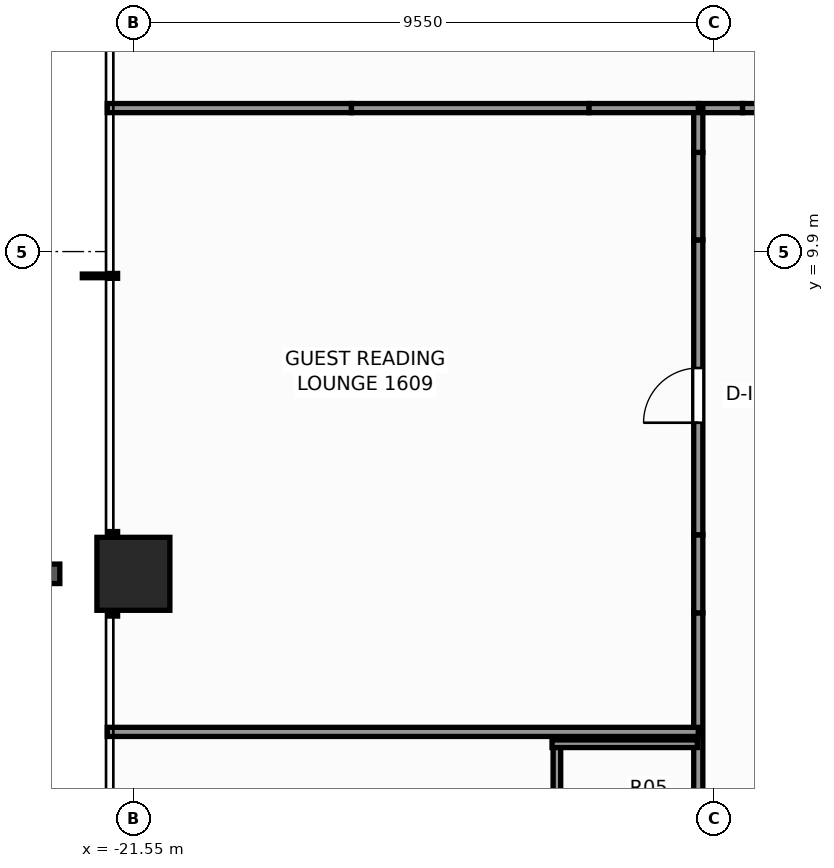
"""IFC4 building model, lengths in metres.
Left out: names, types, materials, properties, quantities, classifications, styles, units other than length and angle.
Written with IfcOpenShell. Run it as: python <this file> out.ifc"""

import sys

from ifc_helpers import new_model, si_unit, direction, frame, frame_2d, origin, origin_2d, place, context, subcontext, project, spatial, rectangle, extrude, element, fill, save


model = new_model("IFC4")
c1 = context("Model", 3, precision=1e-05, world=origin(), true_north=direction((0.0, 1.0)))
c2 = subcontext(c1, "Body", "Model", "MODEL_VIEW")
j1 = project(units=[si_unit("LENGTHUNIT", "METRE"), si_unit("PLANEANGLEUNIT", "RADIAN")], contexts=[c1])
p1 = place(None, origin())
s1 = spatial("IfcSite", under=j1, at=p1, CompositionType="ELEMENT")
p2 = place(p1, origin())
s2 = spatial("IfcBuilding", under=s1, at=p2, CompositionType="ELEMENT")
p3 = place(p2, frame((0.0, 0.0, 56.8)))
s3 = spatial("IfcBuildingStorey", under=s2, at=p3, CompositionType="ELEMENT", Elevation=56.8)
p4 = place(p3, frame((-21.55, 4.6, 0.0), z_axis=(0.0, 0.0, 1.0), x_axis=(1.0, 0.0, 0.0)))
e1 = element("IfcColumn", 1, at=p4, inside=s3, PredefinedType="COLUMN", context=c2, shape_type="SweptSolid", body=[
    extrude(rectangle(XDim=1.2, YDim=1.2, at=origin_2d()), origin(), (0.0, 0.0, 1.0), 3.3),
])
p5 = place(p3, frame((-12.26, 12.26, 0.0), z_axis=(0.0, 0.0, 1.0), x_axis=(1.0, 0.0, 0.0)))
e2 = element("IfcWall", 2, at=p5, inside=s3, PredefinedType="PARTITIONING", context=c2, shape_type="SweptSolid", body=[
    extrude(rectangle(XDim=0.729, YDim=0.15, at=frame_2d((0.364, 0.0))), origin(), (0.0, 0.0, 1.0), 3.06),
])
p6 = place(p3, frame((-11.531, 12.26, 0.0), z_axis=(0.0, 0.0, 1.0), x_axis=(1.0, 0.0, 0.0)))
e3 = element("IfcWall", 3, at=p6, inside=s3, PredefinedType="PARTITIONING", context=c2, shape_type="SweptSolid", body=[
    extrude(rectangle(XDim=1.439, YDim=0.15, at=frame_2d((0.72, 0.0))), origin(), (0.0, 0.0, 1.0), 1.245),
])
p7 = place(p3, frame((-12.26, -3.958, 0.0), z_axis=(0.0, 0.0, 1.0), x_axis=(0.0, 1.0, 0.0)))
e4 = element("IfcWall", 4, at=p7, inside=s3, PredefinedType="PARTITIONING", context=c2, shape_type="SweptSolid", body=[
    extrude(rectangle(XDim=7.916, YDim=0.15, at=frame_2d((3.958, 0.0))), origin(), (0.0, 0.0, 1.0), 2.349),
])
p8 = place(p7, frame((0.986, 0.0, 0.0)))
e5 = element("IfcOpeningElement", 5, at=p8, cuts=e4, PredefinedType="OPENING", context=c2, shape_type="SweptSolid", body=[
    extrude(rectangle(XDim=0.95, YDim=2.06, at=frame_2d((0.475, 1.03))), frame((0.0, 0.085, 0.0), z_axis=(0.0, -1.0, 0.0), x_axis=(1.0, 0.0, 0.0)), (0.0, 0.0, 1.0), 0.17),
])
p9 = place(p3, frame((-12.26, 3.958, 0.0), z_axis=(0.0, 0.0, 1.0), x_axis=(0.0, 1.0, 0.0)))
e6 = element("IfcWall", 6, at=p9, inside=s3, PredefinedType="PARTITIONING", context=c2, shape_type="SweptSolid", body=[
    extrude(rectangle(XDim=1.284, YDim=0.15, at=frame_2d((0.642, 0.0))), origin(), (0.0, 0.0, 1.0), 1.245),
])
p10 = place(p3, frame((-12.26, 5.242, 0.0), z_axis=(0.0, 0.0, 1.0), x_axis=(0.0, 1.0, 0.0)))
e7 = element("IfcWall", 7, at=p10, inside=s3, PredefinedType="PARTITIONING", context=c2, shape_type="SweptSolid", body=[
    extrude(rectangle(XDim=4.85, YDim=0.15, at=frame_2d((2.425, 0.0))), origin(), (0.0, 0.0, 1.0), 3.06),
])
p11 = place(p10, frame((1.843, 0.0, 0.0)))
e8 = element("IfcOpeningElement", 8, at=p11, cuts=e7, PredefinedType="OPENING", context=c2, shape_type="SweptSolid", body=[
    extrude(rectangle(XDim=0.9, YDim=2.06, at=frame_2d((0.45, 1.03))), frame((0.0, 0.085, 0.0), z_axis=(0.0, -1.0, 0.0), x_axis=(1.0, 0.0, 0.0)), (0.0, 0.0, 1.0), 0.17),
])
p12 = place(p3, frame((-12.26, 10.092, 0.0), z_axis=(0.0, 0.0, 1.0), x_axis=(0.0, 1.0, 0.0)))
e9 = element("IfcWall", 9, at=p12, inside=s3, PredefinedType="PARTITIONING", context=c2, shape_type="SweptSolid", body=[
    extrude(rectangle(XDim=1.439, YDim=0.15, at=frame_2d((0.72, 0.0))), origin(), (0.0, 0.0, 1.0), 1.245),
])
p13 = place(p3, frame((-12.26, 11.531, 0.0), z_axis=(0.0, 0.0, 1.0), x_axis=(0.0, 1.0, 0.0)))
e10 = element("IfcWall", 10, at=p13, inside=s3, PredefinedType="PARTITIONING", context=c2, shape_type="SweptSolid", body=[
    extrude(rectangle(XDim=0.729, YDim=0.15, at=frame_2d((0.364, 0.0))), origin(), (0.0, 0.0, 1.0), 3.06),
])
p14 = place(p3, frame((-21.98, 12.26, 0.0), z_axis=(0.0, 0.0, 1.0), x_axis=(1.0, 0.0, 0.0)))
e11 = element("IfcWall", 11, at=p14, inside=s3, PredefinedType="PARTITIONING", context=c2, shape_type="SweptSolid", body=[
    extrude(rectangle(XDim=4.017, YDim=0.15, at=frame_2d((2.008, 0.0))), origin(), (0.0, 0.0, 1.0), 2.429),
])
p15 = place(p3, frame((-17.963, 12.26, 0.0), z_axis=(0.0, 0.0, 1.0), x_axis=(1.0, 0.0, 0.0)))
e12 = element("IfcWall", 12, at=p15, inside=s3, PredefinedType="PARTITIONING", context=c2, shape_type="SweptSolid", body=[
    extrude(rectangle(XDim=3.907, YDim=0.15, at=frame_2d((1.954, 0.0))), origin(), (0.0, 0.0, 1.0), 1.245),
])
p16 = place(p3, frame((-14.056, 12.26, 0.0), z_axis=(0.0, 0.0, 1.0), x_axis=(1.0, 0.0, 0.0)))
e13 = element("IfcWall", 13, at=p16, inside=s3, PredefinedType="PARTITIONING", context=c2, shape_type="SweptSolid", body=[
    extrude(rectangle(XDim=1.796, YDim=0.15, at=frame_2d((0.898, 0.0))), origin(), (0.0, 0.0, 1.0), 3.06),
])
p17 = place(p3, frame((-21.98, 2.0, 0.0), z_axis=(0.0, 0.0, 1.0), x_axis=(1.0, 0.0, 0.0)))
e14 = element("IfcWall", 14, at=p17, inside=s3, PredefinedType="PARTITIONING", context=c2, shape_type="SweptSolid", body=[
    extrude(rectangle(XDim=9.72, YDim=0.15, at=frame_2d((4.86, 0.0))), origin(), (0.0, 0.0, 1.0), 2.429),
])
p18 = place(p3, frame((-14.585, -0.905, 0.0), z_axis=(0.0, 0.0, 1.0), x_axis=(0.0, 1.0, 0.0)))
e15 = element("IfcWall", 15, at=p18, inside=s3, PredefinedType="PARTITIONING", context=c2, shape_type="SweptSolid", body=[
    extrude(rectangle(XDim=2.77, YDim=0.125, at=frame_2d((1.385, 0.0))), origin(), (0.0, 0.0, 1.0), 2.585),
])
p19 = place(p3, frame((-14.665, 1.805, 0.0), z_axis=(0.0, 0.0, 1.0), x_axis=(1.0, 0.0, 0.0)))
e16 = element("IfcWall", 16, at=p19, inside=s3, PredefinedType="PARTITIONING", context=c2, shape_type="SweptSolid", body=[
    extrude(rectangle(XDim=2.39, YDim=0.125, at=frame_2d((1.195, 0.0))), origin(), (0.0, 0.0, 1.0), 3.06),
])
p20 = place(p11, origin())
e17 = element("IfcDoor", 17, at=p20, inside=s3, OperationType="SINGLE_SWING_LEFT", PredefinedType="DOOR", context=c2, shape_type="SweptSolid", body=[
    extrude(rectangle(XDim=0.9, YDim=2.06, at=frame_2d((0.45, 1.03))), frame((0.0, 0.025, 0.0), z_axis=(0.0, -1.0, 0.0), x_axis=(1.0, 0.0, 0.0)), (0.0, 0.0, 1.0), 0.05),
])
fill(e8, e17)
save(model, sys.argv[1])
